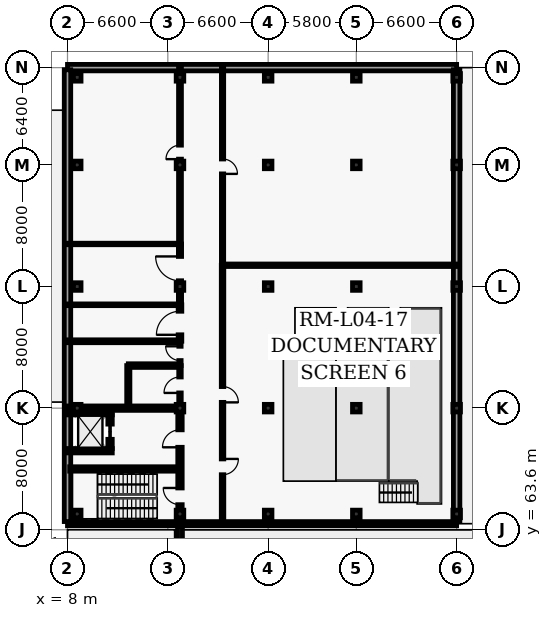
"""IFC4 building model, lengths in metres.
Left out: names, types, materials, properties, quantities, classifications, styles, units other than length and angle.
Written with IfcOpenShell. Run it as: python <this file> out.ifc"""

import sys

from ifc_helpers import new_model, si_unit, direction, frame, frame_2d, origin, origin_2d, place, context, subcontext, project, spatial, rectangle, extrude, element, fill, save


model = new_model("IFC4")
c1 = context("Model", 3, precision=1e-05, world=origin(), true_north=direction((0.0, 1.0)))
c2 = subcontext(c1, "Body", "Model", "MODEL_VIEW")
j1 = project(units=[si_unit("LENGTHUNIT", "METRE"), si_unit("PLANEANGLEUNIT", "RADIAN")], contexts=[c1])
p1 = place(None, origin())
s1 = spatial("IfcSite", under=j1, at=p1, CompositionType="ELEMENT")
p2 = place(p1, origin())
s2 = spatial("IfcBuilding", under=s1, at=p2, CompositionType="ELEMENT")
p3 = place(p2, frame((0.0, 0.0, 20.4)))
s3 = spatial("IfcBuildingStorey", under=s2, at=p3, CompositionType="ELEMENT", Elevation=20.4)
for number, where, z_axis, x_axis in (
    (1, (8.64, 64.64, 0.0), (0.0, 0.0, 1.0), (1.0, 0.0, 0.0)),
    (2, (8.64, 71.6, 0.0), (0.0, 0.0, 1.0), (1.0, 0.0, 0.0)),
    (3, (8.64, 79.6, 0.0), (0.0, 0.0, 1.0), (1.0, 0.0, 0.0)),
    (4, (8.64, 87.6, 0.0), (0.0, 0.0, 1.0), (1.0, 0.0, 0.0)),
    (5, (8.64, 93.36, 0.0), (0.0, 0.0, 1.0), (1.0, 0.0, 0.0)),
    (6, (15.4, 64.64, 0.0), (0.0, 0.0, 1.0), (1.0, 0.0, 0.0)),
    (7, (15.4, 71.6, 0.0), (0.0, 0.0, 1.0), (1.0, 0.0, 0.0)),
    (8, (15.4, 79.6, 0.0), (0.0, 0.0, 1.0), (1.0, 0.0, 0.0)),
    (9, (15.4, 87.6, 0.0), (0.0, 0.0, 1.0), (1.0, 0.0, 0.0)),
    (10, (15.4, 93.36, 0.0), (0.0, 0.0, 1.0), (1.0, 0.0, 0.0)),
    (11, (21.2, 64.64, 0.0), (0.0, 0.0, 1.0), (1.0, 0.0, 0.0)),
    (12, (21.2, 71.6, 0.0), (0.0, 0.0, 1.0), (1.0, 0.0, 0.0)),
    (13, (21.2, 79.6, 0.0), (0.0, 0.0, 1.0), (1.0, 0.0, 0.0)),
    (14, (21.2, 87.6, 0.0), (0.0, 0.0, 1.0), (1.0, 0.0, 0.0)),
    (15, (21.2, 93.36, 0.0), (0.0, 0.0, 1.0), (1.0, 0.0, 0.0)),
    (16, (27.0, 64.64, 0.0), (0.0, 0.0, 1.0), (1.0, 0.0, 0.0)),
    (17, (27.0, 71.6, 0.0), (0.0, 0.0, 1.0), (1.0, 0.0, 0.0)),
    (18, (27.0, 79.6, 0.0), (0.0, 0.0, 1.0), (1.0, 0.0, 0.0)),
    (19, (27.0, 87.6, 0.0), (0.0, 0.0, 1.0), (1.0, 0.0, 0.0)),
    (20, (27.0, 93.36, 0.0), (0.0, 0.0, 1.0), (1.0, 0.0, 0.0)),
    (21, (33.6, 64.64, 0.0), (0.0, 0.0, 1.0), (1.0, 0.0, 0.0)),
    (22, (33.6, 71.6, 0.0), (0.0, 0.0, 1.0), (1.0, 0.0, 0.0)),
    (23, (33.6, 79.6, 0.0), (0.0, 0.0, 1.0), (1.0, 0.0, 0.0)),
    (24, (33.6, 87.6, 0.0), (0.0, 0.0, 1.0), (1.0, 0.0, 0.0)),
    (25, (33.6, 93.36, 0.0), (0.0, 0.0, 1.0), (1.0, 0.0, 0.0)),
):
    element("IfcColumn", number, at=place(p3, frame(where, z_axis=z_axis, x_axis=x_axis)), inside=s3, PredefinedType="COLUMN", context=c2, shape_type="SweptSolid", body=[
        extrude(rectangle(XDim=0.5, YDim=0.5, at=origin_2d()), origin(), (0.0, 0.0, 1.0), 4.5),
    ])
p4 = place(p3, frame((8.0, 94.0, 0.0), z_axis=(0.0, 0.0, 1.0), x_axis=(1.0, 0.0, 0.0)))
e26 = element("IfcWall", 26, at=p4, inside=s3, PredefinedType="SOLIDWALL", context=c2, shape_type="SweptSolid", body=[
    extrude(rectangle(XDim=25.6, YDim=0.425, at=frame_2d((12.8, 0.0))), origin(), (0.0, 0.0, 1.0), 4.28),
])
p5 = place(p3, frame((33.6, 93.86, 0.0), z_axis=(0.0, 0.0, 1.0), x_axis=(0.0, -1.0, 0.0)))
e27 = element("IfcWall", 27, at=p5, inside=s3, PredefinedType="SOLIDWALL", context=c2, shape_type="SweptSolid", body=[
    extrude(rectangle(XDim=29.72, YDim=0.425, at=frame_2d((14.86, 0.0))), origin(), (0.0, 0.0, 1.0), 3.43),
])
p6 = place(p3, frame((33.6, 64.0, 0.0), z_axis=(0.0, 0.0, 1.0), x_axis=(-1.0, 0.0, 0.0)))
e28 = element("IfcWall", 28, at=p6, inside=s3, PredefinedType="SOLIDWALL", context=c2, shape_type="SweptSolid", body=[
    extrude(rectangle(XDim=25.6, YDim=0.275, at=frame_2d((12.8, 0.0))), origin(), (0.0, 0.0, 1.0), 4.28),
])
p7 = place(p3, frame((8.0, 64.14, 0.0), z_axis=(0.0, 0.0, 1.0), x_axis=(0.0, 1.0, 0.0)))
e29 = element("IfcWall", 29, at=p7, inside=s3, PredefinedType="SOLIDWALL", context=c2, shape_type="SweptSolid", body=[
    extrude(rectangle(XDim=29.72, YDim=0.425, at=frame_2d((14.86, 0.0))), origin(), (0.0, 0.0, 1.0), 4.28),
])
p8 = place(p3, frame((15.4, 60.948, -1.44), z_axis=(0.0, 0.0, 1.0), x_axis=(0.0, 1.0, 0.0)))
e30 = element("IfcWall", 30, at=p8, inside=s3, PredefinedType="SOLIDWALL", context=c2, shape_type="SweptSolid", body=[
    extrude(rectangle(XDim=2.91, YDim=0.32, at=frame_2d((1.455, 0.0))), origin(), (0.0, 0.0, 1.0), 2.08),
])
p9 = place(p3, frame((7.855, 71.6, 0.0), z_axis=(0.0, 0.0, 1.0), x_axis=(1.0, 0.0, 0.0)))
e31 = element("IfcWall", 31, at=p9, inside=s3, PredefinedType="SHEAR", context=c2, shape_type="SweptSolid", body=[
    extrude(rectangle(XDim=7.293, YDim=0.29, at=frame_2d((3.646, 0.0))), origin(), (0.0, 0.0, 1.0), 4.28),
])
p10 = place(p3, frame((15.4, 64.145, 0.0), z_axis=(0.0, 0.0, 1.0), x_axis=(0.0, 1.0, 0.0)))
e32 = element("IfcWall", 32, at=p10, inside=s3, PredefinedType="SHEAR", context=c2, shape_type="SweptSolid", body=[
    extrude(rectangle(XDim=7.203, YDim=0.29, at=frame_2d((3.602, 0.0))), origin(), (0.0, 0.0, 1.0), 4.28),
])
p11 = place(p10, frame((1.105, 0.0, 0.0)))
e33 = element("IfcOpeningElement", 33, at=p11, cuts=e32, PredefinedType="OPENING", context=c2, shape_type="SweptSolid", body=[
    extrude(rectangle(XDim=1.1, YDim=2.15, at=frame_2d((0.55, 1.075))), frame((0.0, 0.155, 0.0), z_axis=(0.0, -1.0, 0.0), x_axis=(1.0, 0.0, 0.0)), (0.0, 0.0, 1.0), 0.31),
])
p12 = place(p10, frame((4.88, 0.0, 0.0)))
e34 = element("IfcOpeningElement", 34, at=p12, cuts=e32, PredefinedType="OPENING", context=c2, shape_type="SweptSolid", body=[
    extrude(rectangle(XDim=1.15, YDim=2.2, at=frame_2d((0.575, 1.1))), frame((0.0, 0.155, 0.0), z_axis=(0.0, -1.0, 0.0), x_axis=(1.0, 0.0, 0.0)), (0.0, 0.0, 1.0), 0.31),
])
p13 = place(p3, frame((8.145, 67.6, 0.0), z_axis=(0.0, 0.0, 1.0), x_axis=(1.0, 0.0, 0.0)))
e35 = element("IfcWall", 35, at=p13, inside=s3, PredefinedType="SHEAR", context=c2, shape_type="SweptSolid", body=[
    extrude(rectangle(XDim=7.11, YDim=0.29, at=frame_2d((3.555, 0.0))), origin(), (0.0, 0.0, 1.0), 4.28),
])
for number, where, z_axis, x_axis in (
    (36, (8.055, 68.8, 0.0), (0.0, 0.0, 1.0), (1.0, 0.0, 0.0)),
    (37, (8.055, 71.3, 0.0), (0.0, 0.0, 1.0), (1.0, 0.0, 0.0)),
):
    element("IfcWall", number, at=place(p3, frame(where, z_axis=z_axis, x_axis=x_axis)), inside=s3, PredefinedType="SHEAR", context=c2, shape_type="SweptSolid", body=[
        extrude(rectangle(XDim=2.89, YDim=0.29, at=frame_2d((1.445, 0.0))), origin(), (0.0, 0.0, 1.0), 4.28),
    ])
p14 = place(p3, frame((10.8, 68.945, 0.0), z_axis=(0.0, 0.0, 1.0), x_axis=(0.0, 1.0, 0.0)))
e38 = element("IfcWall", 38, at=p14, inside=s3, PredefinedType="SHEAR", context=c2, shape_type="SweptSolid", body=[
    extrude(rectangle(XDim=2.21, YDim=0.29, at=frame_2d((1.105, 0.0))), origin(), (0.0, 0.0, 1.0), 4.28),
])
p15 = place(p14, frame((0.605, 0.0, 0.0)))
e39 = element("IfcOpeningElement", 39, at=p15, cuts=e38, PredefinedType="OPENING", context=c2, shape_type="SweptSolid", body=[
    extrude(rectangle(XDim=1.0, YDim=2.15, at=frame_2d((0.5, 1.075))), frame((0.0, 0.155, 0.0), z_axis=(0.0, -1.0, 0.0), x_axis=(1.0, 0.0, 0.0)), (0.0, 0.0, 1.0), 0.31),
])
p16 = place(p3, frame((15.4, 71.852, 0.0), z_axis=(0.0, 0.0, 1.0), x_axis=(0.0, 1.0, 0.0)))
e40 = element("IfcWall", 40, at=p16, inside=s3, PredefinedType="PARTITIONING", context=c2, shape_type="SweptSolid", body=[
    extrude(rectangle(XDim=2.548, YDim=0.165, at=frame_2d((1.274, 0.0))), origin(), (0.0, 0.0, 1.0), 3.43),
])
p17 = place(p16, frame((0.749, 0.0, 0.0)))
e41 = element("IfcOpeningElement", 41, at=p17, cuts=e40, PredefinedType="OPENING", context=c2, shape_type="SweptSolid", body=[
    extrude(rectangle(XDim=1.05, YDim=2.15, at=frame_2d((0.525, 1.075))), frame((0.0, 0.093, 0.0), z_axis=(0.0, -1.0, 0.0), x_axis=(1.0, 0.0, 0.0)), (0.0, 0.0, 1.0), 0.185),
])
p18 = place(p3, frame((15.4, 74.4, 0.0), z_axis=(0.0, 0.0, 1.0), x_axis=(0.0, 1.0, 0.0)))
e42 = element("IfcWall", 42, at=p18, inside=s3, PredefinedType="PARTITIONING", context=c2, shape_type="SweptSolid", body=[
    extrude(rectangle(XDim=1.6, YDim=0.15, at=frame_2d((0.8, 0.0))), origin(), (0.0, 0.0, 1.0), 3.43),
])
p19 = place(p18, frame((0.33, 0.0, 0.0)))
e43 = element("IfcOpeningElement", 43, at=p19, cuts=e42, PredefinedType="OPENING", context=c2, shape_type="SweptSolid", body=[
    extrude(rectangle(XDim=0.94, YDim=2.15, at=frame_2d((0.47, 1.075))), frame((0.0, 0.085, 0.0), z_axis=(0.0, -1.0, 0.0), x_axis=(1.0, 0.0, 0.0)), (0.0, 0.0, 1.0), 0.17),
])
p20 = place(p3, frame((15.4, 76.0, 0.0), z_axis=(0.0, 0.0, 1.0), x_axis=(0.0, 1.0, 0.0)))
e44 = element("IfcWall", 44, at=p20, inside=s3, PredefinedType="PARTITIONING", context=c2, shape_type="SweptSolid", body=[
    extrude(rectangle(XDim=2.4, YDim=0.24, at=frame_2d((1.2, 0.0))), origin(), (0.0, 0.0, 1.0), 3.43),
])
p21 = place(p20, frame((0.425, 0.0, 0.0)))
e45 = element("IfcOpeningElement", 45, at=p21, cuts=e44, PredefinedType="OPENING", context=c2, shape_type="SweptSolid", body=[
    extrude(rectangle(XDim=1.55, YDim=2.25, at=frame_2d((0.775, 1.125))), frame((0.0, 0.13, 0.0), z_axis=(0.0, -1.0, 0.0), x_axis=(1.0, 0.0, 0.0)), (0.0, 0.0, 1.0), 0.26),
])
p22 = place(p3, frame((15.4, 78.4, 0.0), z_axis=(0.0, 0.0, 1.0), x_axis=(0.0, 1.0, 0.0)))
e46 = element("IfcWall", 46, at=p22, inside=s3, PredefinedType="PARTITIONING", context=c2, shape_type="SweptSolid", body=[
    extrude(rectangle(XDim=4.0, YDim=0.21, at=frame_2d((2.0, 0.0))), origin(), (0.0, 0.0, 1.0), 3.43),
])
p23 = place(p22, frame((1.58, 0.0, 0.0)))
e47 = element("IfcOpeningElement", 47, at=p23, cuts=e46, PredefinedType="OPENING", context=c2, shape_type="SweptSolid", body=[
    extrude(rectangle(XDim=1.6, YDim=2.3, at=frame_2d((0.8, 1.15))), frame((0.0, 0.115, 0.0), z_axis=(0.0, -1.0, 0.0), x_axis=(1.0, 0.0, 0.0)), (0.0, 0.0, 1.0), 0.23),
])
p24 = place(p3, frame((15.4, 82.4, 0.0), z_axis=(0.0, 0.0, 1.0), x_axis=(0.0, 1.0, 0.0)))
e48 = element("IfcWall", 48, at=p24, inside=s3, PredefinedType="PARTITIONING", context=c2, shape_type="SweptSolid", body=[
    extrude(rectangle(XDim=11.6, YDim=0.19, at=frame_2d((5.8, 0.0))), origin(), (0.0, 0.0, 1.0), 3.43),
])
p25 = place(p24, frame((5.58, 0.0, 0.0)))
e49 = element("IfcOpeningElement", 49, at=p25, cuts=e48, PredefinedType="OPENING", context=c2, shape_type="SweptSolid", body=[
    extrude(rectangle(XDim=0.92, YDim=2.1, at=frame_2d((0.46, 1.05))), frame((0.0, 0.105, 0.0), z_axis=(0.0, -1.0, 0.0), x_axis=(1.0, 0.0, 0.0)), (0.0, 0.0, 1.0), 0.21),
])
p26 = place(p3, frame((18.2, 81.0, 0.0), z_axis=(0.0, 0.0, 1.0), x_axis=(0.0, -1.0, 0.0)))
e50 = element("IfcWall", 50, at=p26, inside=s3, PredefinedType="PARTITIONING", context=c2, shape_type="SweptSolid", body=[
    extrude(rectangle(XDim=17.0, YDim=0.165, at=frame_2d((8.5, 0.0))), origin(), (0.0, 0.0, 1.0), 4.28),
])
p27 = place(p26, frame((7.98, 0.0, 0.0)))
e51 = element("IfcOpeningElement", 51, at=p27, cuts=e50, PredefinedType="OPENING", context=c2, shape_type="SweptSolid", body=[
    extrude(rectangle(XDim=1.04, YDim=2.2, at=frame_2d((0.52, 1.1))), frame((0.0, 0.093, 0.0), z_axis=(0.0, -1.0, 0.0), x_axis=(1.0, 0.0, 0.0)), (0.0, 0.0, 1.0), 0.185),
])
p28 = place(p26, frame((12.74, 0.0, 0.0)))
e52 = element("IfcOpeningElement", 52, at=p28, cuts=e50, PredefinedType="OPENING", context=c2, shape_type="SweptSolid", body=[
    extrude(rectangle(XDim=1.04, YDim=2.2, at=frame_2d((0.52, 1.1))), frame((0.0, 0.093, 0.0), z_axis=(0.0, -1.0, 0.0), x_axis=(1.0, 0.0, 0.0)), (0.0, 0.0, 1.0), 0.185),
])
p29 = place(p3, frame((18.2, 94.0, 0.0), z_axis=(0.0, 0.0, 1.0), x_axis=(0.0, -1.0, 0.0)))
e53 = element("IfcWall", 53, at=p29, inside=s3, PredefinedType="PARTITIONING", context=c2, shape_type="SweptSolid", body=[
    extrude(rectangle(XDim=13.0, YDim=0.15, at=frame_2d((6.5, 0.0))), origin(), (0.0, 0.0, 1.0), 4.28),
])
p30 = place(p29, frame((6.01, 0.0, 0.0)))
e54 = element("IfcOpeningElement", 54, at=p30, cuts=e53, PredefinedType="OPENING", context=c2, shape_type="SweptSolid", body=[
    extrude(rectangle(XDim=0.98, YDim=2.1, at=frame_2d((0.49, 1.05))), frame((0.0, 0.085, 0.0), z_axis=(0.0, -1.0, 0.0), x_axis=(1.0, 0.0, 0.0)), (0.0, 0.0, 1.0), 0.17),
])
p31 = place(p3, frame((12.0, 74.4, 0.0), z_axis=(0.0, 0.0, 1.0), x_axis=(1.0, 0.0, 0.0)))
e55 = element("IfcWall", 55, at=p31, inside=s3, PredefinedType="PARTITIONING", context=c2, shape_type="SweptSolid", body=[
    extrude(rectangle(XDim=3.4, YDim=0.24, at=frame_2d((1.7, 0.0))), origin(), (0.0, 0.0, 1.0), 4.28),
])
p32 = place(p3, frame((12.0, 71.6, 0.0), z_axis=(0.0, 0.0, 1.0), x_axis=(0.0, 1.0, 0.0)))
e56 = element("IfcWall", 56, at=p32, inside=s3, PredefinedType="PARTITIONING", context=c2, shape_type="SweptSolid", body=[
    extrude(rectangle(XDim=2.8, YDim=0.21, at=frame_2d((1.4, 0.0))), origin(), (0.0, 0.0, 1.0), 4.28),
])
p33 = place(p3, frame((8.0, 76.0, 0.0), z_axis=(0.0, 0.0, 1.0), x_axis=(1.0, 0.0, 0.0)))
e57 = element("IfcWall", 57, at=p33, inside=s3, PredefinedType="PARTITIONING", context=c2, shape_type="SweptSolid", body=[
    extrude(rectangle(XDim=7.4, YDim=0.19, at=frame_2d((3.7, 0.0))), origin(), (0.0, 0.0, 1.0), 4.28),
])
p34 = place(p3, frame((8.0, 78.4, 0.0), z_axis=(0.0, 0.0, 1.0), x_axis=(1.0, 0.0, 0.0)))
e58 = element("IfcWall", 58, at=p34, inside=s3, PredefinedType="PARTITIONING", context=c2, shape_type="SweptSolid", body=[
    extrude(rectangle(XDim=7.4, YDim=0.115, at=frame_2d((3.7, 0.0))), origin(), (0.0, 0.0, 1.0), 4.28),
])
p35 = place(p3, frame((8.0, 82.4, 0.0), z_axis=(0.0, 0.0, 1.0), x_axis=(1.0, 0.0, 0.0)))
e59 = element("IfcWall", 59, at=p35, inside=s3, PredefinedType="PARTITIONING", context=c2, shape_type="SweptSolid", body=[
    extrude(rectangle(XDim=7.4, YDim=0.1, at=frame_2d((3.7, 0.0))), origin(), (0.0, 0.0, 1.0), 4.28),
])
p36 = place(p3, frame((18.2, 81.0, 0.0), z_axis=(0.0, 0.0, 1.0), x_axis=(1.0, 0.0, 0.0)))
e60 = element("IfcWall", 60, at=p36, inside=s3, PredefinedType="PARTITIONING", context=c2, shape_type="SweptSolid", body=[
    extrude(rectangle(XDim=15.4, YDim=0.165, at=frame_2d((7.7, 0.0))), origin(), (0.0, 0.0, 1.0), 4.28),
])
p37 = place(p11, origin())
e61 = element("IfcDoor", 61, at=p37, inside=s3, OperationType="SINGLE_SWING_RIGHT", PredefinedType="DOOR", context=c2, shape_type="SweptSolid", body=[
    extrude(rectangle(XDim=1.1, YDim=2.15, at=frame_2d((0.55, 1.075))), frame((0.0, 0.025, 0.0), z_axis=(0.0, -1.0, 0.0), x_axis=(1.0, 0.0, 0.0)), (0.0, 0.0, 1.0), 0.05),
])
fill(e33, e61)
p38 = place(p12, origin())
e62 = element("IfcDoor", 62, at=p38, inside=s3, OperationType="SINGLE_SWING_LEFT", PredefinedType="DOOR", context=c2, shape_type="SweptSolid", body=[
    extrude(rectangle(XDim=1.15, YDim=2.2, at=frame_2d((0.575, 1.1))), frame((0.0, 0.025, 0.0), z_axis=(0.0, -1.0, 0.0), x_axis=(1.0, 0.0, 0.0)), (0.0, 0.0, 1.0), 0.05),
])
fill(e34, e62)
p39 = place(p15, origin())
e63 = element("IfcDoor", 63, at=p39, inside=s3, OperationType="SLIDING_TO_LEFT", PredefinedType="DOOR", context=c2, shape_type="SweptSolid", body=[
    extrude(rectangle(XDim=1.0, YDim=2.15, at=frame_2d((0.5, 1.075))), frame((0.0, 0.025, 0.0), z_axis=(0.0, -1.0, 0.0), x_axis=(1.0, 0.0, 0.0)), (0.0, 0.0, 1.0), 0.05),
])
fill(e39, e63)
p40 = place(p17, origin())
e64 = element("IfcDoor", 64, at=p40, inside=s3, OperationType="SINGLE_SWING_LEFT", PredefinedType="DOOR", context=c2, shape_type="SweptSolid", body=[
    extrude(rectangle(XDim=1.05, YDim=2.15, at=frame_2d((0.525, 1.075))), frame((0.0, 0.025, 0.0), z_axis=(0.0, -1.0, 0.0), x_axis=(1.0, 0.0, 0.0)), (0.0, 0.0, 1.0), 0.05),
])
fill(e41, e64)
p41 = place(p19, origin())
e65 = element("IfcDoor", 65, at=p41, inside=s3, OperationType="SINGLE_SWING_RIGHT", PredefinedType="DOOR", context=c2, shape_type="SweptSolid", body=[
    extrude(rectangle(XDim=0.94, YDim=2.15, at=frame_2d((0.47, 1.075))), frame((0.0, 0.025, 0.0), z_axis=(0.0, -1.0, 0.0), x_axis=(1.0, 0.0, 0.0)), (0.0, 0.0, 1.0), 0.05),
])
fill(e43, e65)
p42 = place(p21, origin())
e66 = element("IfcDoor", 66, at=p42, inside=s3, OperationType="SINGLE_SWING_LEFT", PredefinedType="DOOR", context=c2, shape_type="SweptSolid", body=[
    extrude(rectangle(XDim=1.55, YDim=2.25, at=frame_2d((0.775, 1.125))), frame((0.0, 0.025, 0.0), z_axis=(0.0, -1.0, 0.0), x_axis=(1.0, 0.0, 0.0)), (0.0, 0.0, 1.0), 0.05),
])
fill(e45, e66)
p43 = place(p23, origin())
e67 = element("IfcDoor", 67, at=p43, inside=s3, OperationType="SINGLE_SWING_RIGHT", PredefinedType="DOOR", context=c2, shape_type="SweptSolid", body=[
    extrude(rectangle(XDim=1.6, YDim=2.3, at=frame_2d((0.8, 1.15))), frame((0.0, 0.025, 0.0), z_axis=(0.0, -1.0, 0.0), x_axis=(1.0, 0.0, 0.0)), (0.0, 0.0, 1.0), 0.05),
])
fill(e47, e67)
p44 = place(p25, origin())
e68 = element("IfcDoor", 68, at=p44, inside=s3, OperationType="SINGLE_SWING_LEFT", PredefinedType="DOOR", context=c2, shape_type="SweptSolid", body=[
    extrude(rectangle(XDim=0.92, YDim=2.1, at=frame_2d((0.46, 1.05))), frame((0.0, 0.025, 0.0), z_axis=(0.0, -1.0, 0.0), x_axis=(1.0, 0.0, 0.0)), (0.0, 0.0, 1.0), 0.05),
])
fill(e49, e68)
p45 = place(p27, origin())
e69 = element("IfcDoor", 69, at=p45, inside=s3, OperationType="SINGLE_SWING_RIGHT", PredefinedType="DOOR", context=c2, shape_type="SweptSolid", body=[
    extrude(rectangle(XDim=1.04, YDim=2.2, at=frame_2d((0.52, 1.1))), frame((0.0, 0.025, 0.0), z_axis=(0.0, -1.0, 0.0), x_axis=(1.0, 0.0, 0.0)), (0.0, 0.0, 1.0), 0.05),
])
fill(e51, e69)
p46 = place(p28, origin())
e70 = element("IfcDoor", 70, at=p46, inside=s3, OperationType="SINGLE_SWING_LEFT", PredefinedType="DOOR", context=c2, shape_type="SweptSolid", body=[
    extrude(rectangle(XDim=1.04, YDim=2.2, at=frame_2d((0.52, 1.1))), frame((0.0, 0.025, 0.0), z_axis=(0.0, -1.0, 0.0), x_axis=(1.0, 0.0, 0.0)), (0.0, 0.0, 1.0), 0.05),
])
fill(e52, e70)
p47 = place(p30, origin())
e71 = element("IfcDoor", 71, at=p47, inside=s3, OperationType="SINGLE_SWING_RIGHT", PredefinedType="DOOR", context=c2, shape_type="SweptSolid", body=[
    extrude(rectangle(XDim=0.98, YDim=2.1, at=frame_2d((0.49, 1.05))), frame((0.0, 0.025, 0.0), z_axis=(0.0, -1.0, 0.0), x_axis=(1.0, 0.0, 0.0)), (0.0, 0.0, 1.0), 0.05),
])
fill(e54, e71)
save(model, sys.argv[1])
